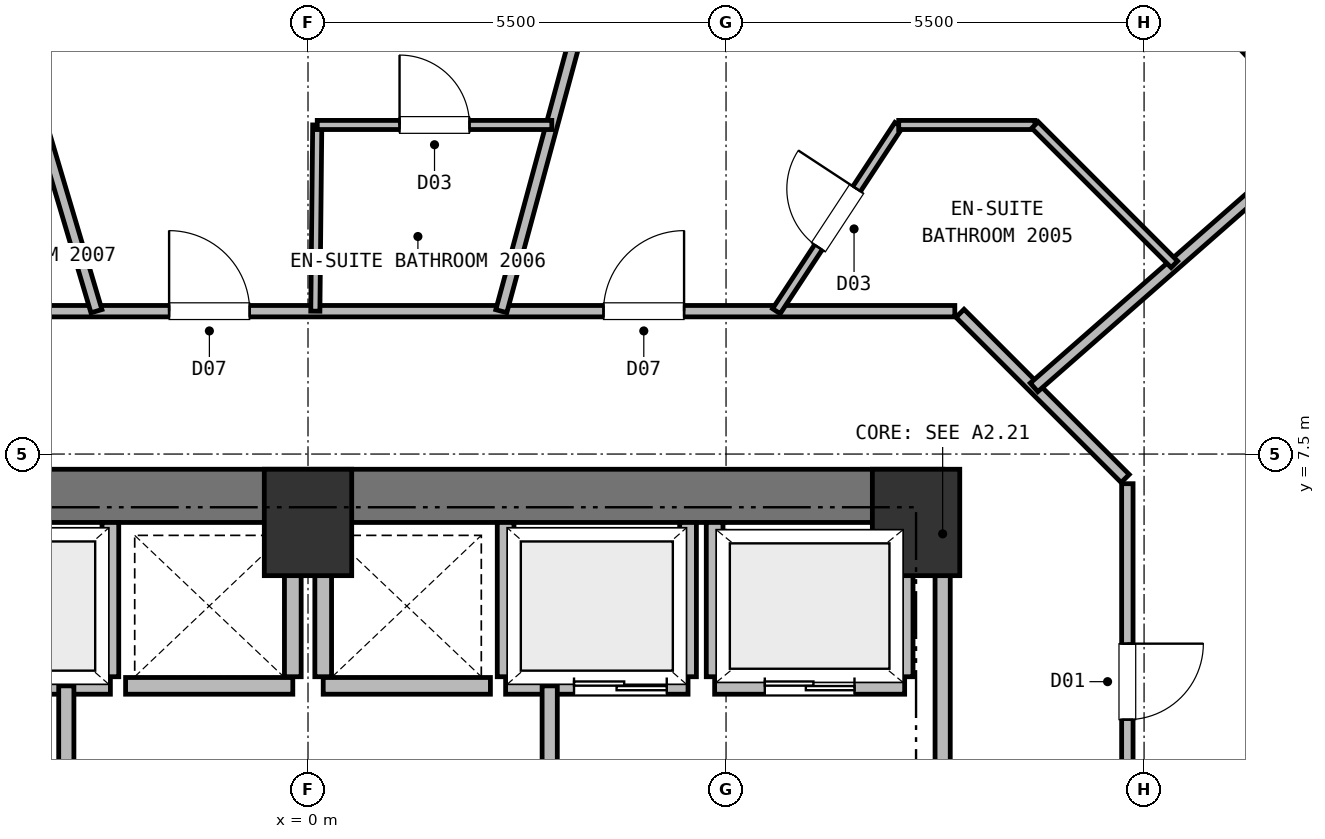
"""IFC4 building model, lengths in metres.
Left out: names, types, materials, properties, quantities, classifications, styles, units other than length and angle.
Written with IfcOpenShell. Run it as: python <this file> out.ifc"""

import sys

from ifc_helpers import new_model, si_unit, direction, frame, frame_2d, origin, origin_2d, place, context, subcontext, project, spatial, rectangle, extrude, element, fill, save


model = new_model("IFC4")
c1 = context("Model", 3, precision=1e-05, world=origin(), true_north=direction((0.0, 1.0)))
c2 = subcontext(c1, "Body", "Model", "MODEL_VIEW")
j1 = project(units=[si_unit("LENGTHUNIT", "METRE"), si_unit("PLANEANGLEUNIT", "RADIAN")], contexts=[c1])
p1 = place(None, origin())
s1 = spatial("IfcSite", under=j1, at=p1, CompositionType="ELEMENT")
p2 = place(p1, origin())
s2 = spatial("IfcBuilding", under=s1, at=p2, CompositionType="ELEMENT")
p3 = place(p2, frame((0.0, 0.0, 71.75)))
s3 = spatial("IfcBuildingStorey", under=s2, at=p3, CompositionType="ELEMENT", Elevation=71.75)
for number, where, z_axis, x_axis in (
    (1, (8.0, 6.6, 0.0), (0.0, 0.0, 1.0), (1.0, 0.0, 0.0)),
    (2, (0.0, 6.6, 0.0), (0.0, 0.0, 1.0), (1.0, 0.0, 0.0)),
):
    element("IfcColumn", number, at=place(p3, frame(where, z_axis=z_axis, x_axis=x_axis)), inside=s3, PredefinedType="COLUMN", context=c2, shape_type="SweptSolid", body=[
        extrude(rectangle(XDim=1.15, YDim=1.4, at=origin_2d()), origin(), (0.0, 0.0, 1.0), 3.75),
    ])
p4 = place(p3, frame((-8.35, 6.95, 0.0), z_axis=(0.0, 0.0, 1.0), x_axis=(1.0, 0.0, 0.0)))
e3 = element("IfcWall", 3, at=p4, inside=s3, PredefinedType="SHEAR", context=c2, shape_type="SweptSolid", body=[
    extrude(rectangle(XDim=16.7, YDim=0.7, at=frame_2d((8.35, 0.0))), origin(), (0.0, 0.0, 1.0), 3.5),
])
p5 = place(p3, frame((11.33, 14.082, 0.0), z_axis=(0.0, 0.0, 1.0), x_axis=(0.684867242206, -0.728667867106, 0.0)))
e4 = element("IfcWall", 4, at=p5, inside=s3, PredefinedType="SOLIDWALL", context=c2, shape_type="SweptSolid", body=[
    extrude(rectangle(XDim=2.91, YDim=0.36, at=frame_2d((1.455, 0.0))), origin(), (0.0, 0.0, 1.0), 3.5),
])
p6 = place(p5, frame((0.655, 0.0, 0.72)))
e5 = element("IfcOpeningElement", 5, at=p6, cuts=e4, PredefinedType="OPENING", context=c2, shape_type="SweptSolid", body=[
    extrude(rectangle(XDim=1.6, YDim=1.88, at=frame_2d((0.8, 0.94))), frame((0.0, 0.19, 0.0), z_axis=(0.0, -1.0, 0.0), x_axis=(1.0, 0.0, 0.0)), (0.0, 0.0, 1.0), 0.38),
])
p7 = place(p3, frame((5.35, 4.45, 0.0), z_axis=(0.0, 0.0, 1.0), x_axis=(1.0, 0.0, 0.0)))
e6 = element("IfcWall", 6, at=p7, inside=s3, PredefinedType="PARTITIONING", context=c2, shape_type="SweptSolid", body=[
    extrude(rectangle(XDim=2.5, YDim=0.22, at=frame_2d((1.25, 0.0))), origin(), (0.0, 0.0, 1.0), 3.5),
])
p8 = place(p7, frame((0.66, 0.0, 0.0)))
e7 = element("IfcOpeningElement", 7, at=p8, cuts=e6, PredefinedType="OPENING", context=c2, shape_type="SweptSolid", body=[
    extrude(rectangle(XDim=1.18, YDim=2.15, at=frame_2d((0.59, 1.075))), frame((0.0, 0.12, 0.0), z_axis=(0.0, -1.0, 0.0), x_axis=(1.0, 0.0, 0.0)), (0.0, 0.0, 1.0), 0.24),
])
p9 = place(p3, frame((5.35, 4.57, 0.0), z_axis=(0.0, 0.0, 1.0), x_axis=(0.0, 1.0, 0.0)))
e8 = element("IfcWall", 8, at=p9, inside=s3, PredefinedType="PARTITIONING", context=c2, shape_type="SweptSolid", body=[
    extrude(rectangle(XDim=2.03, YDim=0.22, at=frame_2d((1.015, 0.0))), origin(), (0.0, 0.0, 1.0), 3.5),
])
p10 = place(p3, frame((7.85, 4.57, 0.0), z_axis=(0.0, 0.0, 1.0), x_axis=(0.0, 1.0, 0.0)))
e9 = element("IfcWall", 9, at=p10, inside=s3, PredefinedType="PARTITIONING", context=c2, shape_type="SweptSolid", body=[
    extrude(rectangle(XDim=2.03, YDim=0.22, at=frame_2d((1.015, 0.0))), origin(), (0.0, 0.0, 1.0), 3.08),
])
p11 = place(p3, frame((-5.0, 4.45, 0.0), z_axis=(0.0, 0.0, 1.0), x_axis=(1.0, 0.0, 0.0)))
e10 = element("IfcWall", 10, at=p11, inside=s3, PredefinedType="PARTITIONING", context=c2, shape_type="SweptSolid", body=[
    extrude(rectangle(XDim=2.4, YDim=0.22, at=frame_2d((1.2, 0.0))), origin(), (0.0, 0.0, 1.0), 3.5),
])
p12 = place(p11, frame((0.28, 0.0, 0.0)))
e11 = element("IfcOpeningElement", 11, at=p12, cuts=e10, PredefinedType="OPENING", context=c2, shape_type="SweptSolid", body=[
    extrude(rectangle(XDim=1.22, YDim=2.15, at=frame_2d((0.61, 1.075))), frame((0.0, 0.12, 0.0), z_axis=(0.0, -1.0, 0.0), x_axis=(1.0, 0.0, 0.0)), (0.0, 0.0, 1.0), 0.24),
])
p13 = place(p3, frame((-2.6, 4.57, 0.0), z_axis=(0.0, 0.0, 1.0), x_axis=(0.0, 1.0, 0.0)))
e12 = element("IfcWall", 12, at=p13, inside=s3, PredefinedType="PARTITIONING", context=c2, shape_type="SweptSolid", body=[
    extrude(rectangle(XDim=2.03, YDim=0.22, at=frame_2d((1.015, 0.0))), origin(), (0.0, 0.0, 1.0), 3.5),
])
p14 = place(p3, frame((2.6, 4.45, 0.0), z_axis=(0.0, 0.0, 1.0), x_axis=(1.0, 0.0, 0.0)))
e13 = element("IfcWall", 13, at=p14, inside=s3, PredefinedType="PARTITIONING", context=c2, shape_type="SweptSolid", body=[
    extrude(rectangle(XDim=2.4, YDim=0.22, at=frame_2d((1.2, 0.0))), origin(), (0.0, 0.0, 1.0), 3.5),
])
p15 = place(p14, frame((0.9, 0.0, 0.0)))
e14 = element("IfcOpeningElement", 14, at=p15, cuts=e13, PredefinedType="OPENING", context=c2, shape_type="SweptSolid", body=[
    extrude(rectangle(XDim=1.22, YDim=2.15, at=frame_2d((0.61, 1.075))), frame((0.0, 0.12, 0.0), z_axis=(0.0, -1.0, 0.0), x_axis=(1.0, 0.0, 0.0)), (0.0, 0.0, 1.0), 0.24),
])
for number, where, z_axis, x_axis in (
    (15, (2.6, 4.57, 0.0), (0.0, 0.0, 1.0), (0.0, 1.0, 0.0)),
    (16, (5.0, 4.57, 0.0), (0.0, 0.0, 1.0), (0.0, 1.0, 0.0)),
):
    element("IfcWall", number, at=place(p3, frame(where, z_axis=z_axis, x_axis=x_axis)), inside=s3, PredefinedType="PARTITIONING", context=c2, shape_type="SweptSolid", body=[
        extrude(rectangle(XDim=2.03, YDim=0.22, at=frame_2d((1.015, 0.0))), origin(), (0.0, 0.0, 1.0), 3.5),
    ])
p16 = place(p3, frame((-2.4, 4.45, 0.0), z_axis=(0.0, 0.0, 1.0), x_axis=(1.0, 0.0, 0.0)))
e17 = element("IfcWall", 17, at=p16, inside=s3, PredefinedType="PARTITIONING", context=c2, shape_type="SweptSolid", body=[
    extrude(rectangle(XDim=2.2, YDim=0.22, at=frame_2d((1.1, 0.0))), origin(), (0.0, 0.0, 1.0), 3.5),
])
p17 = place(p3, frame((-0.2, 4.57, 0.0), z_axis=(0.0, 0.0, 1.0), x_axis=(0.0, 1.0, 0.0)))
e18 = element("IfcWall", 18, at=p17, inside=s3, PredefinedType="PARTITIONING", context=c2, shape_type="SweptSolid", body=[
    extrude(rectangle(XDim=2.03, YDim=0.22, at=frame_2d((1.015, 0.0))), origin(), (0.0, 0.0, 1.0), 3.5),
])
p18 = place(p3, frame((0.2, 4.45, 0.0), z_axis=(0.0, 0.0, 1.0), x_axis=(1.0, 0.0, 0.0)))
e19 = element("IfcWall", 19, at=p18, inside=s3, PredefinedType="PARTITIONING", context=c2, shape_type="SweptSolid", body=[
    extrude(rectangle(XDim=2.2, YDim=0.22, at=frame_2d((1.1, 0.0))), origin(), (0.0, 0.0, 1.0), 3.5),
])
p19 = place(p3, frame((0.2, 4.57, 0.0), z_axis=(0.0, 0.0, 1.0), x_axis=(0.0, 1.0, 0.0)))
e20 = element("IfcWall", 20, at=p19, inside=s3, PredefinedType="PARTITIONING", context=c2, shape_type="SweptSolid", body=[
    extrude(rectangle(XDim=2.03, YDim=0.22, at=frame_2d((1.015, 0.0))), origin(), (0.0, 0.0, 1.0), 3.5),
])
p20 = place(p3, frame((-3.18, 1.15, 0.0), z_axis=(0.0, 0.0, 1.0), x_axis=(0.0, 1.0, 0.0)))
e21 = element("IfcWall", 21, at=p20, inside=s3, PredefinedType="PARTITIONING", context=c2, shape_type="SweptSolid", body=[
    extrude(rectangle(XDim=3.3, YDim=0.2, at=frame_2d((1.65, 0.0))), origin(), (0.0, 0.0, 1.0), 3.5),
])
p21 = place(p20, frame((1.08, 0.0, 0.0)))
e22 = element("IfcOpeningElement", 22, at=p21, cuts=e21, PredefinedType="OPENING", context=c2, shape_type="SweptSolid", body=[
    extrude(rectangle(XDim=1.15, YDim=2.15, at=frame_2d((0.575, 1.075))), frame((0.0, 0.11, 0.0), z_axis=(0.0, -1.0, 0.0), x_axis=(1.0, 0.0, 0.0)), (0.0, 0.0, 1.0), 0.22),
])
p22 = place(p3, frame((3.18, 1.15, 0.0), z_axis=(0.0, 0.0, 1.0), x_axis=(0.0, 1.0, 0.0)))
e23 = element("IfcWall", 23, at=p22, inside=s3, PredefinedType="PARTITIONING", context=c2, shape_type="SweptSolid", body=[
    extrude(rectangle(XDim=3.3, YDim=0.2, at=frame_2d((1.65, 0.0))), origin(), (0.0, 0.0, 1.0), 3.5),
])
p23 = place(p22, frame((1.08, 0.0, 0.0)))
e24 = element("IfcOpeningElement", 24, at=p23, cuts=e23, PredefinedType="OPENING", context=c2, shape_type="SweptSolid", body=[
    extrude(rectangle(XDim=1.15, YDim=2.15, at=frame_2d((0.575, 1.075))), frame((0.0, 0.11, 0.0), z_axis=(0.0, -1.0, 0.0), x_axis=(1.0, 0.0, 0.0)), (0.0, 0.0, 1.0), 0.22),
])
p24 = place(p3, frame((8.35, 1.25, 0.0), z_axis=(0.0, 0.0, 1.0), x_axis=(0.0, 1.0, 0.0)))
e25 = element("IfcWall", 25, at=p24, inside=s3, PredefinedType="PARTITIONING", context=c2, shape_type="SweptSolid", body=[
    extrude(rectangle(XDim=5.3, YDim=0.2, at=frame_2d((2.65, 0.0))), origin(), (0.0, 0.0, 1.0), 3.5),
])
p25 = place(p24, frame((0.95, 0.0, 0.0)))
e26 = element("IfcOpeningElement", 26, at=p25, cuts=e25, PredefinedType="OPENING", context=c2, shape_type="SweptSolid", body=[
    extrude(rectangle(XDim=1.15, YDim=2.15, at=frame_2d((0.575, 1.075))), frame((0.0, 0.11, 0.0), z_axis=(0.0, -1.0, 0.0), x_axis=(1.0, 0.0, 0.0)), (0.0, 0.0, 1.0), 0.22),
])
p26 = place(p3, frame((10.78, 7.11, 0.0), z_axis=(0.0, 0.0, 1.0), x_axis=(0.0, -1.0, 0.0)))
e27 = element("IfcWall", 27, at=p26, inside=s3, PredefinedType="PARTITIONING", context=c2, shape_type="SweptSolid", body=[
    extrude(rectangle(XDim=14.22, YDim=0.15, at=frame_2d((7.11, 0.0))), origin(), (0.0, 0.0, 1.0), 3.12),
])
p27 = place(p26, frame((2.105, 0.0, 0.0)))
e28 = element("IfcOpeningElement", 28, at=p27, cuts=e27, PredefinedType="OPENING", context=c2, shape_type="SweptSolid", body=[
    extrude(rectangle(XDim=1.0, YDim=2.15, at=frame_2d((0.5, 1.075))), frame((0.0, 0.085, 0.0), z_axis=(0.0, -1.0, 0.0), x_axis=(1.0, 0.0, 0.0)), (0.0, 0.0, 1.0), 0.17),
])
p28 = place(p26, frame((12.075, 0.0, 0.0)))
e29 = element("IfcOpeningElement", 29, at=p28, cuts=e27, PredefinedType="OPENING", context=c2, shape_type="SweptSolid", body=[
    extrude(rectangle(XDim=1.06, YDim=2.15, at=frame_2d((0.53, 1.075))), frame((0.0, 0.085, 0.0), z_axis=(0.0, -1.0, 0.0), x_axis=(1.0, 0.0, 0.0)), (0.0, 0.0, 1.0), 0.17),
])
p29 = place(p26, frame((6.074, 0.0, 0.0)))
e30 = element("IfcOpeningElement", 30, at=p29, cuts=e27, PredefinedType="OPENING", context=c2, shape_type="SweptSolid", body=[
    extrude(rectangle(XDim=1.06, YDim=2.15, at=frame_2d((0.53, 1.075))), frame((0.0, 0.085, 0.0), z_axis=(0.0, -1.0, 0.0), x_axis=(1.0, 0.0, 0.0)), (0.0, 0.0, 1.0), 0.17),
])
p30 = place(p3, frame((8.578, 9.352, 0.0), z_axis=(0.0, 0.0, 1.0), x_axis=(0.707067066127, -0.707146494016, 0.0)))
e31 = element("IfcWall", 31, at=p30, inside=s3, PredefinedType="PARTITIONING", context=c2, shape_type="SweptSolid", body=[
    extrude(rectangle(XDim=3.074, YDim=0.15, at=frame_2d((1.537, 0.0))), origin(), (0.0, 0.0, 1.0), 3.5),
])
p31 = place(p3, frame((-8.51, 9.38, 0.0), z_axis=(0.0, 0.0, 1.0), x_axis=(1.0, 0.0, 0.0)))
e32 = element("IfcWall", 32, at=p31, inside=s3, PredefinedType="PARTITIONING", context=c2, shape_type="SweptSolid", body=[
    extrude(rectangle(XDim=17.02, YDim=0.15, at=frame_2d((8.51, 0.0))), origin(), (0.0, 0.0, 1.0), 3.5),
])
p32 = place(p31, frame((12.398, 0.0, 0.0)))
e33 = element("IfcOpeningElement", 33, at=p32, cuts=e32, PredefinedType="OPENING", context=c2, shape_type="SweptSolid", body=[
    extrude(rectangle(XDim=1.06, YDim=2.15, at=frame_2d((0.53, 1.075))), frame((0.0, 0.085, 0.0), z_axis=(0.0, -1.0, 0.0), x_axis=(1.0, 0.0, 0.0)), (0.0, 0.0, 1.0), 0.17),
])
p33 = place(p31, frame((1.007, 0.0, 0.0)))
e34 = element("IfcOpeningElement", 34, at=p33, cuts=e32, PredefinedType="OPENING", context=c2, shape_type="SweptSolid", body=[
    extrude(rectangle(XDim=1.06, YDim=2.15, at=frame_2d((0.53, 1.075))), frame((0.0, 0.085, 0.0), z_axis=(0.0, -1.0, 0.0), x_axis=(1.0, 0.0, 0.0)), (0.0, 0.0, 1.0), 0.17),
])
p34 = place(p31, frame((6.683, 0.0, 0.0)))
e35 = element("IfcOpeningElement", 35, at=p34, cuts=e32, PredefinedType="OPENING", context=c2, shape_type="SweptSolid", body=[
    extrude(rectangle(XDim=1.06, YDim=2.15, at=frame_2d((0.53, 1.075))), frame((0.0, 0.085, 0.0), z_axis=(0.0, -1.0, 0.0), x_axis=(1.0, 0.0, 0.0)), (0.0, 0.0, 1.0), 0.17),
])
p35 = place(p3, frame((10.78, 2.18, 0.0), z_axis=(0.0, 0.0, 1.0), x_axis=(0.980159069469, 0.198212508528, 0.0)))
e36 = element("IfcWall", 36, at=p35, inside=s3, PredefinedType="PARTITIONING", context=c2, shape_type="SweptSolid", body=[
    extrude(rectangle(XDim=8.889, YDim=0.15, at=frame_2d((4.445, 0.0))), origin(), (0.0, 0.0, 1.0), 3.5),
])
p36 = place(p3, frame((9.552, 8.377, 0.0), z_axis=(0.0, 0.0, 1.0), x_axis=(0.751836766188, 0.659349283012, 0.0)))
e37 = element("IfcWall", 37, at=p36, inside=s3, PredefinedType="PARTITIONING", context=c2, shape_type="SweptSolid", body=[
    extrude(rectangle(XDim=5.195, YDim=0.15, at=frame_2d((2.598, 0.0))), origin(), (0.0, 0.0, 1.0), 3.5),
])
p37 = place(p3, frame((6.162, 9.38, 0.0), z_axis=(0.0, 0.0, 1.0), x_axis=(0.54905657123, 0.835785188664, 0.0)))
e38 = element("IfcWall", 38, at=p37, inside=s3, PredefinedType="PARTITIONING", context=c2, shape_type="SweptSolid", body=[
    extrude(rectangle(XDim=2.932, YDim=0.12, at=frame_2d((1.466, 0.0))), origin(), (0.0, 0.0, 1.0), 3.5),
])
p38 = place(p37, frame((1.006, 0.0, 0.0)))
e39 = element("IfcOpeningElement", 39, at=p38, cuts=e38, PredefinedType="OPENING", context=c2, shape_type="SweptSolid", body=[
    extrude(rectangle(XDim=0.92, YDim=2.1, at=frame_2d((0.46, 1.05))), frame((0.0, 0.07, 0.0), z_axis=(0.0, -1.0, 0.0), x_axis=(1.0, 0.0, 0.0)), (0.0, 0.0, 1.0), 0.14),
])
p39 = place(p3, frame((7.772, 11.83, 0.0), z_axis=(0.0, 0.0, 1.0), x_axis=(1.0, 0.0, 0.0)))
e40 = element("IfcWall", 40, at=p39, inside=s3, PredefinedType="PARTITIONING", context=c2, shape_type="SweptSolid", body=[
    extrude(rectangle(XDim=1.793, YDim=0.12, at=frame_2d((0.896, 0.0))), origin(), (0.0, 0.0, 1.0), 3.5),
])
p40 = place(p3, frame((11.398, 9.996, 0.0), z_axis=(0.0, 0.0, 1.0), x_axis=(-0.707106781187, 0.707106781187, 0.0)))
e41 = element("IfcWall", 41, at=p40, inside=s3, PredefinedType="PARTITIONING", context=c2, shape_type="SweptSolid", body=[
    extrude(rectangle(XDim=2.593, YDim=0.12, at=frame_2d((1.297, 0.0))), origin(), (0.0, 0.0, 1.0), 3.5),
])
p41 = place(p3, frame((2.543, 9.38, 0.0), z_axis=(0.0, 0.0, 1.0), x_axis=(0.26169188867, 0.965151467597, 0.0)))
e42 = element("IfcWall", 42, at=p41, inside=s3, PredefinedType="PARTITIONING", context=c2, shape_type="SweptSolid", body=[
    extrude(rectangle(XDim=10.509, YDim=0.15, at=frame_2d((5.254, 0.0))), origin(), (0.0, 0.0, 1.0), 3.5),
])
p42 = place(p3, frame((0.096, 9.38, 0.0), z_axis=(0.0, 0.0, 1.0), x_axis=(0.010262512547, 0.999947339032, 0.0)))
e43 = element("IfcWall", 43, at=p42, inside=s3, PredefinedType="PARTITIONING", context=c2, shape_type="SweptSolid", body=[
    extrude(rectangle(XDim=2.45, YDim=0.12, at=frame_2d((1.225, 0.0))), origin(), (0.0, 0.0, 1.0), 3.5),
])
p43 = place(p3, frame((0.122, 11.83, 0.0), z_axis=(0.0, 0.0, 1.0), x_axis=(1.0, 0.0, 0.0)))
e44 = element("IfcWall", 44, at=p43, inside=s3, PredefinedType="PARTITIONING", context=c2, shape_type="SweptSolid", body=[
    extrude(rectangle(XDim=3.086, YDim=0.12, at=frame_2d((1.543, 0.0))), origin(), (0.0, 0.0, 1.0), 3.5),
])
p44 = place(p43, frame((1.083, 0.0, 0.0)))
e45 = element("IfcOpeningElement", 45, at=p44, cuts=e44, PredefinedType="OPENING", context=c2, shape_type="SweptSolid", body=[
    extrude(rectangle(XDim=0.92, YDim=2.1, at=frame_2d((0.46, 1.05))), frame((0.0, 0.07, 0.0), z_axis=(0.0, -1.0, 0.0), x_axis=(1.0, 0.0, 0.0)), (0.0, 0.0, 1.0), 0.14),
])
p45 = place(p3, frame((-2.783, 9.38, 0.0), z_axis=(0.0, 0.0, 1.0), x_axis=(-0.284496959379, 0.958676942512, 0.0)))
e46 = element("IfcWall", 46, at=p45, inside=s3, PredefinedType="PARTITIONING", context=c2, shape_type="SweptSolid", body=[
    extrude(rectangle(XDim=15.5, YDim=0.15, at=frame_2d((7.75, 0.0))), origin(), (0.0, 0.0, 1.0), 3.5),
])
p46 = place(p6, origin())
e47 = element("IfcWindow", 47, at=p46, inside=s3, PartitioningType="SINGLE_PANEL", PredefinedType="WINDOW", context=c2, shape_type="SweptSolid", body=[
    extrude(rectangle(XDim=1.6, YDim=1.88, at=frame_2d((0.8, 0.94))), frame((0.0, 0.03, 0.0), z_axis=(0.0, -1.0, 0.0), x_axis=(1.0, 0.0, 0.0)), (0.0, 0.0, 1.0), 0.06),
])
fill(e5, e47)
p47 = place(p8, origin())
e48 = element("IfcDoor", 48, at=p47, inside=s3, OperationType="DOUBLE_DOOR_SLIDING", PredefinedType="DOOR", context=c2, shape_type="SweptSolid", body=[
    extrude(rectangle(XDim=1.18, YDim=2.15, at=frame_2d((0.59, 1.075))), frame((0.0, 0.025, 0.0), z_axis=(0.0, -1.0, 0.0), x_axis=(1.0, 0.0, 0.0)), (0.0, 0.0, 1.0), 0.05),
])
fill(e7, e48)
p48 = place(p15, origin())
e49 = element("IfcDoor", 49, at=p48, inside=s3, OperationType="DOUBLE_DOOR_SLIDING", PredefinedType="DOOR", context=c2, shape_type="SweptSolid", body=[
    extrude(rectangle(XDim=1.22, YDim=2.15, at=frame_2d((0.61, 1.075))), frame((0.0, 0.025, 0.0), z_axis=(0.0, -1.0, 0.0), x_axis=(1.0, 0.0, 0.0)), (0.0, 0.0, 1.0), 0.05),
])
fill(e14, e49)
p49 = place(p38, origin())
e50 = element("IfcDoor", 50, at=p49, inside=s3, OperationType="SINGLE_SWING_RIGHT", PredefinedType="DOOR", context=c2, shape_type="SweptSolid", body=[
    extrude(rectangle(XDim=0.92, YDim=2.1, at=frame_2d((0.46, 1.05))), frame((0.0, 0.025, 0.0), z_axis=(0.0, -1.0, 0.0), x_axis=(1.0, 0.0, 0.0)), (0.0, 0.0, 1.0), 0.05),
])
fill(e39, e50)
p50 = place(p44, origin())
e51 = element("IfcDoor", 51, at=p50, inside=s3, OperationType="SINGLE_SWING_LEFT", PredefinedType="DOOR", context=c2, shape_type="SweptSolid", body=[
    extrude(rectangle(XDim=0.92, YDim=2.1, at=frame_2d((0.46, 1.05))), frame((0.0, 0.025, 0.0), z_axis=(0.0, -1.0, 0.0), x_axis=(1.0, 0.0, 0.0)), (0.0, 0.0, 1.0), 0.05),
])
fill(e45, e51)
p51 = place(p27, origin())
e52 = element("IfcDoor", 52, at=p51, inside=s3, OperationType="SINGLE_SWING_LEFT", PredefinedType="DOOR", context=c2, shape_type="SweptSolid", body=[
    extrude(rectangle(XDim=1.0, YDim=2.15, at=frame_2d((0.5, 1.075))), frame((0.0, 0.025, 0.0), z_axis=(0.0, -1.0, 0.0), x_axis=(1.0, 0.0, 0.0)), (0.0, 0.0, 1.0), 0.05),
])
fill(e28, e52)
p52 = place(p32, origin())
e53 = element("IfcDoor", 53, at=p52, inside=s3, OperationType="SINGLE_SWING_RIGHT", PredefinedType="DOOR", context=c2, shape_type="SweptSolid", body=[
    extrude(rectangle(XDim=1.06, YDim=2.15, at=frame_2d((0.53, 1.075))), frame((0.0, 0.025, 0.0), z_axis=(0.0, -1.0, 0.0), x_axis=(1.0, 0.0, 0.0)), (0.0, 0.0, 1.0), 0.05),
])
fill(e33, e53)
p53 = place(p34, origin())
e54 = element("IfcDoor", 54, at=p53, inside=s3, OperationType="SINGLE_SWING_LEFT", PredefinedType="DOOR", context=c2, shape_type="SweptSolid", body=[
    extrude(rectangle(XDim=1.06, YDim=2.15, at=frame_2d((0.53, 1.075))), frame((0.0, 0.025, 0.0), z_axis=(0.0, -1.0, 0.0), x_axis=(1.0, 0.0, 0.0)), (0.0, 0.0, 1.0), 0.05),
])
fill(e35, e54)
save(model, sys.argv[1])
